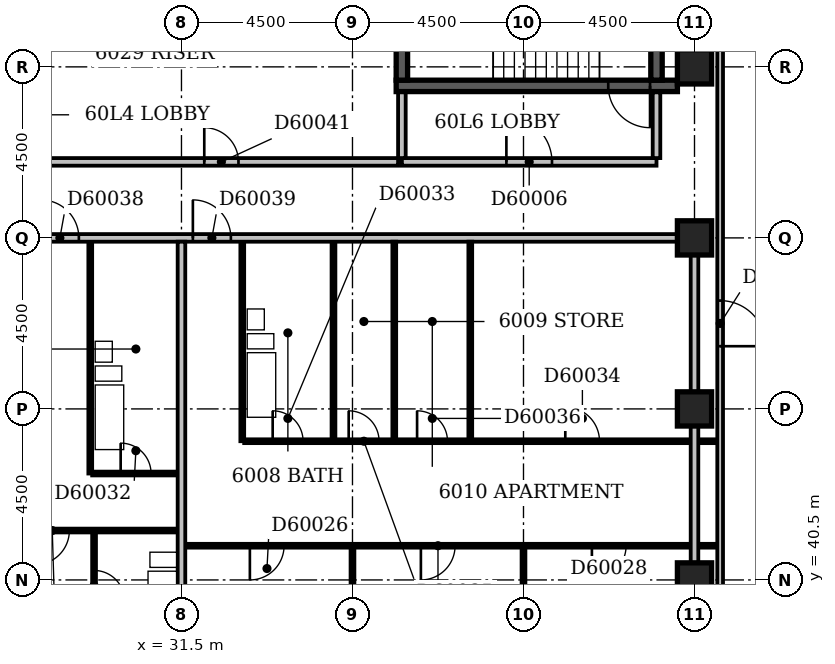
"""IFC4 building model, lengths in metres.
Left out: names, types, materials, properties, quantities, classifications, styles, units other than length and angle.
Written with IfcOpenShell. Run it as: python <this file> out.ifc"""

import sys

from ifc_helpers import new_model, si_unit, direction, frame, frame_2d, origin, origin_2d, place, context, subcontext, project, spatial, rectangle, extrude, element, fill, save


model = new_model("IFC4")
c1 = context("Model", 3, precision=1e-05, world=origin(), true_north=direction((0.0, 1.0)))
c2 = subcontext(c1, "Body", "Model", "MODEL_VIEW")
j1 = project(units=[si_unit("LENGTHUNIT", "METRE"), si_unit("PLANEANGLEUNIT", "RADIAN")], contexts=[c1])
p1 = place(None, origin())
s1 = spatial("IfcSite", under=j1, at=p1, CompositionType="ELEMENT")
p2 = place(p1, origin())
s2 = spatial("IfcBuilding", under=s1, at=p2, CompositionType="ELEMENT")
p3 = place(p2, frame((0.0, 0.0, 233.0)))
s3 = spatial("IfcBuildingStorey", under=s2, at=p3, CompositionType="ELEMENT", Elevation=233.0)
p4 = place(p3, frame((37.15, 53.5, -0.35), z_axis=(0.0, 0.0, 1.0), x_axis=(1.0, 0.0, 0.0)))
e1 = element("IfcWall", 1, at=p4, inside=s3, PredefinedType="SHEAR", context=c2, shape_type="SweptSolid", body=[
    extrude(rectangle(XDim=7.4, YDim=0.3, at=frame_2d((3.7, 0.0))), origin(), (0.0, 0.0, 1.0), 3.65),
])
p5 = place(p4, frame((5.58, 0.0, 0.35)))
e2 = element("IfcOpeningElement", 2, at=p5, cuts=e1, PredefinedType="OPENING", context=c2, shape_type="SweptSolid", body=[
    extrude(rectangle(XDim=1.1, YDim=2.1, at=frame_2d((0.55, 1.05))), frame((0.0, 0.162, 0.0), z_axis=(0.0, -1.0, 0.0), x_axis=(1.0, 0.0, 0.0)), (0.0, 0.0, 1.0), 0.324),
])
for number, where, z_axis, x_axis in (
    (3, (37.3, 53.65, -0.35), (0.0, 0.0, 1.0), (0.0, 1.0, 0.0)),
    (4, (44.0, 53.65, -0.35), (0.0, 0.0, 1.0), (0.0, 1.0, 0.0)),
):
    element("IfcWall", number, at=place(p3, frame(where, z_axis=z_axis, x_axis=x_axis)), inside=s3, PredefinedType="SHEAR", context=c2, shape_type="SweptSolid", body=[
        extrude(rectangle(XDim=4.2, YDim=0.3, at=frame_2d((2.1, 0.0))), origin(), (0.0, 0.0, 1.0), 3.65),
    ])
for number, where, z_axis, x_axis in (
    (5, (45.0, 40.5, -0.35), (0.0, 0.0, 1.0), (1.0, 0.0, 0.0)),
    (6, (45.0, 45.0, -0.35), (0.0, 0.0, 1.0), (1.0, 0.0, 0.0)),
    (7, (45.0, 49.5, -0.35), (0.0, 0.0, 1.0), (1.0, 0.0, 0.0)),
    (8, (45.0, 54.0, -0.35), (0.0, 0.0, 1.0), (1.0, 0.0, 0.0)),
):
    element("IfcColumn", number, at=place(p3, frame(where, z_axis=z_axis, x_axis=x_axis)), inside=s3, PredefinedType="COLUMN", context=c2, shape_type="SweptSolid", body=[
        extrude(rectangle(XDim=0.9, YDim=0.9, at=origin_2d()), origin(), (0.0, 0.0, 1.0), 3.65),
    ])
p6 = place(p3, frame((45.675, 39.9, 0.0), z_axis=(0.0, 0.0, 1.0), x_axis=(0.0, 1.0, 0.0)))
e9 = element("IfcWall", 9, at=p6, inside=s3, PredefinedType="STANDARD", context=c2, shape_type="SweptSolid", body=[
    extrude(rectangle(XDim=19.35, YDim=0.15, at=frame_2d((9.675, 0.0))), origin(), (0.0, 0.0, 1.0), 2.7),
])
p7 = place(p6, frame((6.75, 0.0, 0.0)))
e10 = element("IfcOpeningElement", 10, at=p7, cuts=e9, PredefinedType="OPENING", context=c2, shape_type="SweptSolid", body=[
    extrude(rectangle(XDim=1.2, YDim=2.4, at=frame_2d((0.6, 1.2))), frame((0.0, 0.087, 0.0), z_axis=(0.0, -1.0, 0.0), x_axis=(1.0, 0.0, 0.0)), (0.0, 0.0, 1.0), 0.174),
])
p8 = place(p3, frame((37.3, 51.5, 0.0), z_axis=(0.0, 0.0, 1.0), x_axis=(1.0, 0.0, 0.0)))
e11 = element("IfcWall", 11, at=p8, inside=s3, PredefinedType="PARTITIONING", context=c2, shape_type="SweptSolid", body=[
    extrude(rectangle(XDim=6.7, YDim=0.2, at=frame_2d((3.35, 0.0))), origin(), (0.0, 0.0, 1.0), 3.3),
])
p9 = place(p8, frame((2.75, 0.0, 0.0)))
e12 = element("IfcOpeningElement", 12, at=p9, cuts=e11, PredefinedType="OPENING", context=c2, shape_type="SweptSolid", body=[
    extrude(rectangle(XDim=1.2, YDim=2.1, at=frame_2d((0.6, 1.05))), frame((0.0, 0.112, 0.0), z_axis=(0.0, -1.0, 0.0), x_axis=(1.0, 0.0, 0.0)), (0.0, 0.0, 1.0), 0.224),
])
for number, where, z_axis, x_axis in (
    (13, (44.0, 51.6, 0.0), (0.0, 0.0, 1.0), (0.0, 1.0, 0.0)),
    (14, (37.3, 51.6, 0.0), (0.0, 0.0, 1.0), (0.0, 1.0, 0.0)),
):
    element("IfcWall", number, at=place(p3, frame(where, z_axis=z_axis, x_axis=x_axis)), inside=s3, PredefinedType="PARTITIONING", context=c2, shape_type="SweptSolid", body=[
        extrude(rectangle(XDim=1.73, YDim=0.2, at=frame_2d((0.865, 0.0))), origin(), (0.0, 0.0, 1.0), 3.3),
    ])
p10 = place(p3, frame((31.5, 36.45, 0.0), z_axis=(0.0, 0.0, 1.0), x_axis=(0.0, 1.0, 0.0)))
e15 = element("IfcWall", 15, at=p10, inside=s3, PredefinedType="PARTITIONING", context=c2, shape_type="SweptSolid", body=[
    extrude(rectangle(XDim=12.95, YDim=0.2, at=frame_2d((6.475, 0.0))), origin(), (0.0, 0.0, 1.0), 3.3),
])
p11 = place(p3, frame((36.0, 36.45, 0.0), z_axis=(0.0, 0.0, 1.0), x_axis=(0.0, 1.0, 0.0)))
e16 = element("IfcWall", 16, at=p11, inside=s3, PredefinedType="PARTITIONING", context=c2, shape_type="SweptSolid", body=[
    extrude(rectangle(XDim=4.9, YDim=0.1, at=frame_2d((2.45, 0.0))), origin(), (0.0, 0.0, 1.0), 2.4),
])
p12 = place(p3, frame((40.5, 36.45, 0.0), z_axis=(0.0, 0.0, 1.0), x_axis=(0.0, 1.0, 0.0)))
e17 = element("IfcWall", 17, at=p12, inside=s3, PredefinedType="PARTITIONING", context=c2, shape_type="SweptSolid", body=[
    extrude(rectangle(XDim=4.9, YDim=0.1, at=frame_2d((2.45, 0.0))), origin(), (0.0, 0.0, 1.0), 3.3),
])
p13 = place(p3, frame((29.2, 38.9, 0.0), z_axis=(0.0, 0.0, 1.0), x_axis=(0.0, 1.0, 0.0)))
e18 = element("IfcWall", 18, at=p13, inside=s3, PredefinedType="PLUMBINGWALL", context=c2, shape_type="SweptSolid", body=[
    extrude(rectangle(XDim=2.85, YDim=0.1, at=frame_2d((1.425, 0.0))), origin(), (0.0, 0.0, 1.0), 3.3),
])
p14 = place(p13, frame((1.05, 0.0, 0.0)))
e19 = element("IfcOpeningElement", 19, at=p14, cuts=e18, PredefinedType="OPENING", context=c2, shape_type="SweptSolid", body=[
    extrude(rectangle(XDim=0.8, YDim=2.1, at=frame_2d((0.4, 1.05))), frame((0.0, 0.062, 0.0), z_axis=(0.0, -1.0, 0.0), x_axis=(1.0, 0.0, 0.0)), (0.0, 0.0, 1.0), 0.124),
])
p15 = place(p3, frame((45.0, 40.95, 0.0), z_axis=(0.0, 0.0, 1.0), x_axis=(0.0, 1.0, 0.0)))
e20 = element("IfcWall", 20, at=p15, inside=s3, PredefinedType="PARTITIONING", context=c2, shape_type="SweptSolid", body=[
    extrude(rectangle(XDim=8.1, YDim=0.2, at=frame_2d((4.05, 0.0))), origin(), (0.0, 0.0, 1.0), 2.7),
])
p16 = place(p3, frame((31.6, 41.4, 0.0), z_axis=(0.0, 0.0, 1.0), x_axis=(1.0, 0.0, 0.0)))
e21 = element("IfcWall", 21, at=p16, inside=s3, PredefinedType="PARTITIONING", context=c2, shape_type="SweptSolid", body=[
    extrude(rectangle(XDim=14.0, YDim=0.1, at=frame_2d((7.0, 0.0))), origin(), (0.0, 0.0, 1.0), 3.3),
])
p17 = place(p16, frame((1.7, 0.0, 0.0)))
e22 = element("IfcOpeningElement", 22, at=p17, cuts=e21, PredefinedType="OPENING", context=c2, shape_type="SweptSolid", body=[
    extrude(rectangle(XDim=0.9, YDim=2.1, at=frame_2d((0.45, 1.05))), frame((0.0, 0.062, 0.0), z_axis=(0.0, -1.0, 0.0), x_axis=(1.0, 0.0, 0.0)), (0.0, 0.0, 1.0), 0.124),
])
p18 = place(p16, frame((6.2, 0.0, 0.0)))
e23 = element("IfcOpeningElement", 23, at=p18, cuts=e21, PredefinedType="OPENING", context=c2, shape_type="SweptSolid", body=[
    extrude(rectangle(XDim=0.9, YDim=2.1, at=frame_2d((0.45, 1.05))), frame((0.0, 0.062, 0.0), z_axis=(0.0, -1.0, 0.0), x_axis=(1.0, 0.0, 0.0)), (0.0, 0.0, 1.0), 0.124),
])
p19 = place(p16, frame((10.7, 0.0, 0.0)))
e24 = element("IfcOpeningElement", 24, at=p19, cuts=e21, PredefinedType="OPENING", context=c2, shape_type="SweptSolid", body=[
    extrude(rectangle(XDim=0.9, YDim=2.1, at=frame_2d((0.45, 1.05))), frame((0.0, 0.062, 0.0), z_axis=(0.0, -1.0, 0.0), x_axis=(1.0, 0.0, 0.0)), (0.0, 0.0, 1.0), 0.124),
])
p20 = place(p3, frame((22.6, 41.8, 0.0), z_axis=(0.0, 0.0, 1.0), x_axis=(1.0, 0.0, 0.0)))
e25 = element("IfcWall", 25, at=p20, inside=s3, PredefinedType="PARTITIONING", context=c2, shape_type="SweptSolid", body=[
    extrude(rectangle(XDim=8.8, YDim=0.1, at=frame_2d((4.4, 0.0))), origin(), (0.0, 0.0, 1.0), 3.3),
])
p21 = place(p20, frame((1.7, 0.0, 0.0)))
e26 = element("IfcOpeningElement", 26, at=p21, cuts=e25, PredefinedType="OPENING", context=c2, shape_type="SweptSolid", body=[
    extrude(rectangle(XDim=0.9, YDim=2.1, at=frame_2d((0.45, 1.05))), frame((0.0, 0.062, 0.0), z_axis=(0.0, -1.0, 0.0), x_axis=(1.0, 0.0, 0.0)), (0.0, 0.0, 1.0), 0.124),
])
p22 = place(p20, frame((5.05, 0.0, 0.0)))
e27 = element("IfcOpeningElement", 27, at=p22, cuts=e25, PredefinedType="OPENING", context=c2, shape_type="SweptSolid", body=[
    extrude(rectangle(XDim=0.9, YDim=2.1, at=frame_2d((0.45, 1.05))), frame((0.0, 0.062, 0.0), z_axis=(0.0, -1.0, 0.0), x_axis=(1.0, 0.0, 0.0)), (0.0, 0.0, 1.0), 0.124),
])
p23 = place(p3, frame((29.1, 43.3, 0.0), z_axis=(0.0, 0.0, 1.0), x_axis=(0.0, 1.0, 0.0)))
e28 = element("IfcWall", 28, at=p23, inside=s3, PredefinedType="PLUMBINGWALL", context=c2, shape_type="SweptSolid", body=[
    extrude(rectangle(XDim=6.1, YDim=0.1, at=frame_2d((3.05, 0.0))), origin(), (0.0, 0.0, 1.0), 3.3),
])
p24 = place(p3, frame((29.15, 43.3, 0.0), z_axis=(0.0, 0.0, 1.0), x_axis=(1.0, 0.0, 0.0)))
e29 = element("IfcWall", 29, at=p24, inside=s3, PredefinedType="PARTITIONING", context=c2, shape_type="SweptSolid", body=[
    extrude(rectangle(XDim=2.25, YDim=0.1, at=frame_2d((1.125, 0.0))), origin(), (0.0, 0.0, 1.0), 3.3),
])
p25 = place(p24, frame((0.75, 0.0, 0.0)))
e30 = element("IfcOpeningElement", 30, at=p25, cuts=e29, PredefinedType="OPENING", context=c2, shape_type="SweptSolid", body=[
    extrude(rectangle(XDim=0.8, YDim=2.1, at=frame_2d((0.4, 1.05))), frame((0.0, 0.062, 0.0), z_axis=(0.0, -1.0, 0.0), x_axis=(1.0, 0.0, 0.0)), (0.0, 0.0, 1.0), 0.124),
])
p26 = place(p3, frame((33.1, 44.15, 0.0), z_axis=(0.0, 0.0, 1.0), x_axis=(0.0, 1.0, 0.0)))
e31 = element("IfcWall", 31, at=p26, inside=s3, PredefinedType="PLUMBINGWALL", context=c2, shape_type="SweptSolid", body=[
    extrude(rectangle(XDim=5.25, YDim=0.1, at=frame_2d((2.625, 0.0))), origin(), (0.0, 0.0, 1.0), 3.3),
])
p27 = place(p3, frame((33.15, 44.15, 0.0), z_axis=(0.0, 0.0, 1.0), x_axis=(1.0, 0.0, 0.0)))
e32 = element("IfcWall", 32, at=p27, inside=s3, PredefinedType="PARTITIONING", context=c2, shape_type="SweptSolid", body=[
    extrude(rectangle(XDim=12.45, YDim=0.1, at=frame_2d((6.225, 0.0))), origin(), (0.0, 0.0, 1.0), 3.3),
])
p28 = place(p27, frame((0.75, 0.0, 0.0)))
e33 = element("IfcOpeningElement", 33, at=p28, cuts=e32, PredefinedType="OPENING", context=c2, shape_type="SweptSolid", body=[
    extrude(rectangle(XDim=0.8, YDim=2.1, at=frame_2d((0.4, 1.05))), frame((0.0, 0.062, 0.0), z_axis=(0.0, -1.0, 0.0), x_axis=(1.0, 0.0, 0.0)), (0.0, 0.0, 1.0), 0.124),
])
p29 = place(p27, frame((8.45, 0.0, 0.0)))
e34 = element("IfcOpeningElement", 34, at=p29, cuts=e32, PredefinedType="OPENING", context=c2, shape_type="SweptSolid", body=[
    extrude(rectangle(XDim=0.9, YDim=2.1, at=frame_2d((0.45, 1.05))), frame((0.0, 0.062, 0.0), z_axis=(0.0, -1.0, 0.0), x_axis=(1.0, 0.0, 0.0)), (0.0, 0.0, 1.0), 0.124),
])
p30 = place(p27, frame((2.75, 0.0, 0.0)))
e35 = element("IfcOpeningElement", 35, at=p30, cuts=e32, PredefinedType="OPENING", context=c2, shape_type="SweptSolid", body=[
    extrude(rectangle(XDim=0.8, YDim=2.1, at=frame_2d((0.4, 1.05))), frame((0.0, 0.062, 0.0), z_axis=(0.0, -1.0, 0.0), x_axis=(1.0, 0.0, 0.0)), (0.0, 0.0, 1.0), 0.124),
])
p31 = place(p27, frame((4.55, 0.0, 0.0)))
e36 = element("IfcOpeningElement", 36, at=p31, cuts=e32, PredefinedType="OPENING", context=c2, shape_type="SweptSolid", body=[
    extrude(rectangle(XDim=0.8, YDim=2.1, at=frame_2d((0.4, 1.05))), frame((0.0, 0.062, 0.0), z_axis=(0.0, -1.0, 0.0), x_axis=(1.0, 0.0, 0.0)), (0.0, 0.0, 1.0), 0.124),
])
p32 = place(p3, frame((35.5, 44.2, 0.0), z_axis=(0.0, 0.0, 1.0), x_axis=(0.0, 1.0, 0.0)))
e37 = element("IfcWall", 37, at=p32, inside=s3, PredefinedType="PLUMBINGWALL", context=c2, shape_type="SweptSolid", body=[
    extrude(rectangle(XDim=5.2, YDim=0.1, at=frame_2d((2.6, 0.0))), origin(), (0.0, 0.0, 1.0), 2.4),
])
for number, where, z_axis, x_axis in (
    (38, (37.1, 44.2, 0.0), (0.0, 0.0, 1.0), (0.0, 1.0, 0.0)),
    (39, (39.1, 44.2, 0.0), (0.0, 0.0, 1.0), (0.0, 1.0, 0.0)),
):
    element("IfcWall", number, at=place(p3, frame(where, z_axis=z_axis, x_axis=x_axis)), inside=s3, PredefinedType="PARTITIONING", context=c2, shape_type="SweptSolid", body=[
        extrude(rectangle(XDim=5.2, YDim=0.1, at=frame_2d((2.6, 0.0))), origin(), (0.0, 0.0, 1.0), 3.3),
    ])
p33 = place(p3, frame((22.6, 49.5, 0.0), z_axis=(0.0, 0.0, 1.0), x_axis=(1.0, 0.0, 0.0)))
e40 = element("IfcWall", 40, at=p33, inside=s3, PredefinedType="PARTITIONING", context=c2, shape_type="SweptSolid", body=[
    extrude(rectangle(XDim=21.95, YDim=0.2, at=frame_2d((10.975, 0.0))), origin(), (0.0, 0.0, 1.0), 3.3),
])
p34 = place(p33, frame((5.2, 0.0, 0.0)))
e41 = element("IfcOpeningElement", 41, at=p34, cuts=e40, PredefinedType="OPENING", context=c2, shape_type="SweptSolid", body=[
    extrude(rectangle(XDim=1.0, YDim=2.1, at=frame_2d((0.5, 1.05))), frame((0.0, 0.112, 0.0), z_axis=(0.0, -1.0, 0.0), x_axis=(1.0, 0.0, 0.0)), (0.0, 0.0, 1.0), 0.224),
])
p35 = place(p33, frame((9.2, 0.0, 0.0)))
e42 = element("IfcOpeningElement", 42, at=p35, cuts=e40, PredefinedType="OPENING", context=c2, shape_type="SweptSolid", body=[
    extrude(rectangle(XDim=1.0, YDim=2.1, at=frame_2d((0.5, 1.05))), frame((0.0, 0.112, 0.0), z_axis=(0.0, -1.0, 0.0), x_axis=(1.0, 0.0, 0.0)), (0.0, 0.0, 1.0), 0.224),
])
p36 = place(p3, frame((27.9, 51.5, 0.0), z_axis=(0.0, 0.0, 1.0), x_axis=(1.0, 0.0, 0.0)))
e43 = element("IfcWall", 43, at=p36, inside=s3, PredefinedType="PARTITIONING", context=c2, shape_type="SweptSolid", body=[
    extrude(rectangle(XDim=9.3, YDim=0.2, at=frame_2d((4.65, 0.0))), origin(), (0.0, 0.0, 1.0), 3.3),
])
p37 = place(p36, frame((4.2, 0.0, 0.0)))
e44 = element("IfcOpeningElement", 44, at=p37, cuts=e43, PredefinedType="OPENING", context=c2, shape_type="SweptSolid", body=[
    extrude(rectangle(XDim=0.9, YDim=2.1, at=frame_2d((0.45, 1.05))), frame((0.0, 0.112, 0.0), z_axis=(0.0, -1.0, 0.0), x_axis=(1.0, 0.0, 0.0)), (0.0, 0.0, 1.0), 0.224),
])
p38 = place(p7, origin())
e45 = element("IfcDoor", 45, at=p38, inside=s3, OperationType="DOUBLE_DOOR_SINGLE_SWING", PredefinedType="DOOR", context=c2, shape_type="SweptSolid", body=[
    extrude(rectangle(XDim=1.2, YDim=2.4, at=frame_2d((0.6, 1.2))), frame((0.0, 0.025, 0.0), z_axis=(0.0, -1.0, 0.0), x_axis=(1.0, 0.0, 0.0)), (0.0, 0.0, 1.0), 0.05),
])
fill(e10, e45)
p39 = place(p9, origin())
e46 = element("IfcDoor", 46, at=p39, inside=s3, OperationType="SINGLE_SWING_LEFT", PredefinedType="DOOR", context=c2, shape_type="SweptSolid", body=[
    extrude(rectangle(XDim=1.2, YDim=2.1, at=frame_2d((0.6, 1.05))), frame((0.0, 0.025, 0.0), z_axis=(0.0, -1.0, 0.0), x_axis=(1.0, 0.0, 0.0)), (0.0, 0.0, 1.0), 0.05),
])
fill(e12, e46)
p40 = place(p5, origin())
e47 = element("IfcDoor", 47, at=p40, inside=s3, OperationType="SINGLE_SWING_RIGHT", PredefinedType="DOOR", context=c2, shape_type="SweptSolid", body=[
    extrude(rectangle(XDim=1.1, YDim=2.1, at=frame_2d((0.55, 1.05))), frame((0.0, 0.025, 0.0), z_axis=(0.0, -1.0, 0.0), x_axis=(1.0, 0.0, 0.0)), (0.0, 0.0, 1.0), 0.05),
])
fill(e2, e47)
p41 = place(p14, frame((0.8, 0.0, 0.0), z_axis=(0.0, 0.0, 1.0), x_axis=(-1.0, 0.0, 0.0)))
e48 = element("IfcDoor", 48, at=p41, inside=s3, OperationType="SINGLE_SWING_RIGHT", PredefinedType="DOOR", context=c2, shape_type="SweptSolid", body=[
    extrude(rectangle(XDim=0.8, YDim=2.1, at=frame_2d((0.4, 1.05))), frame((0.0, 0.025, 0.0), z_axis=(0.0, -1.0, 0.0), x_axis=(1.0, 0.0, 0.0)), (0.0, 0.0, 1.0), 0.05),
])
fill(e19, e48)
p42 = place(p17, frame((0.9, 0.0, 0.0), z_axis=(0.0, 0.0, 1.0), x_axis=(-1.0, 0.0, 0.0)))
e49 = element("IfcDoor", 49, at=p42, inside=s3, OperationType="SINGLE_SWING_RIGHT", PredefinedType="DOOR", context=c2, shape_type="SweptSolid", body=[
    extrude(rectangle(XDim=0.9, YDim=2.1, at=frame_2d((0.45, 1.05))), frame((0.0, 0.025, 0.0), z_axis=(0.0, -1.0, 0.0), x_axis=(1.0, 0.0, 0.0)), (0.0, 0.0, 1.0), 0.05),
])
fill(e22, e49)
p43 = place(p18, frame((0.9, 0.0, 0.0), z_axis=(0.0, 0.0, 1.0), x_axis=(-1.0, 0.0, 0.0)))
e50 = element("IfcDoor", 50, at=p43, inside=s3, OperationType="SINGLE_SWING_RIGHT", PredefinedType="DOOR", context=c2, shape_type="SweptSolid", body=[
    extrude(rectangle(XDim=0.9, YDim=2.1, at=frame_2d((0.45, 1.05))), frame((0.0, 0.025, 0.0), z_axis=(0.0, -1.0, 0.0), x_axis=(1.0, 0.0, 0.0)), (0.0, 0.0, 1.0), 0.05),
])
fill(e23, e50)
p44 = place(p19, frame((0.9, 0.0, 0.0), z_axis=(0.0, 0.0, 1.0), x_axis=(-1.0, 0.0, 0.0)))
e51 = element("IfcDoor", 51, at=p44, inside=s3, OperationType="SINGLE_SWING_RIGHT", PredefinedType="DOOR", context=c2, shape_type="SweptSolid", body=[
    extrude(rectangle(XDim=0.9, YDim=2.1, at=frame_2d((0.45, 1.05))), frame((0.0, 0.025, 0.0), z_axis=(0.0, -1.0, 0.0), x_axis=(1.0, 0.0, 0.0)), (0.0, 0.0, 1.0), 0.05),
])
fill(e24, e51)
p45 = place(p22, frame((0.9, 0.0, 0.0), z_axis=(0.0, 0.0, 1.0), x_axis=(-1.0, 0.0, 0.0)))
e52 = element("IfcDoor", 52, at=p45, inside=s3, OperationType="SINGLE_SWING_RIGHT", PredefinedType="DOOR", context=c2, shape_type="SweptSolid", body=[
    extrude(rectangle(XDim=0.9, YDim=2.1, at=frame_2d((0.45, 1.05))), frame((0.0, 0.025, 0.0), z_axis=(0.0, -1.0, 0.0), x_axis=(1.0, 0.0, 0.0)), (0.0, 0.0, 1.0), 0.05),
])
fill(e27, e52)
p46 = place(p25, origin())
e53 = element("IfcDoor", 53, at=p46, inside=s3, OperationType="SINGLE_SWING_LEFT", PredefinedType="DOOR", context=c2, shape_type="SweptSolid", body=[
    extrude(rectangle(XDim=0.8, YDim=2.1, at=frame_2d((0.4, 1.05))), frame((0.0, 0.025, 0.0), z_axis=(0.0, -1.0, 0.0), x_axis=(1.0, 0.0, 0.0)), (0.0, 0.0, 1.0), 0.05),
])
fill(e30, e53)
p47 = place(p28, origin())
e54 = element("IfcDoor", 54, at=p47, inside=s3, OperationType="SINGLE_SWING_LEFT", PredefinedType="DOOR", context=c2, shape_type="SweptSolid", body=[
    extrude(rectangle(XDim=0.8, YDim=2.1, at=frame_2d((0.4, 1.05))), frame((0.0, 0.025, 0.0), z_axis=(0.0, -1.0, 0.0), x_axis=(1.0, 0.0, 0.0)), (0.0, 0.0, 1.0), 0.05),
])
fill(e33, e54)
p48 = place(p29, origin())
e55 = element("IfcDoor", 55, at=p48, inside=s3, OperationType="SINGLE_SWING_LEFT", PredefinedType="DOOR", context=c2, shape_type="SweptSolid", body=[
    extrude(rectangle(XDim=0.9, YDim=2.1, at=frame_2d((0.45, 1.05))), frame((0.0, 0.025, 0.0), z_axis=(0.0, -1.0, 0.0), x_axis=(1.0, 0.0, 0.0)), (0.0, 0.0, 1.0), 0.05),
])
fill(e34, e55)
p49 = place(p30, origin())
e56 = element("IfcDoor", 56, at=p49, inside=s3, OperationType="SINGLE_SWING_LEFT", PredefinedType="DOOR", context=c2, shape_type="SweptSolid", body=[
    extrude(rectangle(XDim=0.8, YDim=2.1, at=frame_2d((0.4, 1.05))), frame((0.0, 0.025, 0.0), z_axis=(0.0, -1.0, 0.0), x_axis=(1.0, 0.0, 0.0)), (0.0, 0.0, 1.0), 0.05),
])
fill(e35, e56)
p50 = place(p31, origin())
e57 = element("IfcDoor", 57, at=p50, inside=s3, OperationType="SINGLE_SWING_LEFT", PredefinedType="DOOR", context=c2, shape_type="SweptSolid", body=[
    extrude(rectangle(XDim=0.8, YDim=2.1, at=frame_2d((0.4, 1.05))), frame((0.0, 0.025, 0.0), z_axis=(0.0, -1.0, 0.0), x_axis=(1.0, 0.0, 0.0)), (0.0, 0.0, 1.0), 0.05),
])
fill(e36, e57)
p51 = place(p34, origin())
e58 = element("IfcDoor", 58, at=p51, inside=s3, OperationType="SINGLE_SWING_LEFT", PredefinedType="DOOR", context=c2, shape_type="SweptSolid", body=[
    extrude(rectangle(XDim=1.0, YDim=2.1, at=frame_2d((0.5, 1.05))), frame((0.0, 0.025, 0.0), z_axis=(0.0, -1.0, 0.0), x_axis=(1.0, 0.0, 0.0)), (0.0, 0.0, 1.0), 0.05),
])
fill(e41, e58)
p52 = place(p35, origin())
e59 = element("IfcDoor", 59, at=p52, inside=s3, OperationType="SINGLE_SWING_LEFT", PredefinedType="DOOR", context=c2, shape_type="SweptSolid", body=[
    extrude(rectangle(XDim=1.0, YDim=2.1, at=frame_2d((0.5, 1.05))), frame((0.0, 0.025, 0.0), z_axis=(0.0, -1.0, 0.0), x_axis=(1.0, 0.0, 0.0)), (0.0, 0.0, 1.0), 0.05),
])
fill(e42, e59)
p53 = place(p37, origin())
e60 = element("IfcDoor", 60, at=p53, inside=s3, OperationType="SINGLE_SWING_LEFT", PredefinedType="DOOR", context=c2, shape_type="SweptSolid", body=[
    extrude(rectangle(XDim=0.9, YDim=2.1, at=frame_2d((0.45, 1.05))), frame((0.0, 0.025, 0.0), z_axis=(0.0, -1.0, 0.0), x_axis=(1.0, 0.0, 0.0)), (0.0, 0.0, 1.0), 0.05),
])
fill(e44, e60)
save(model, sys.argv[1])
